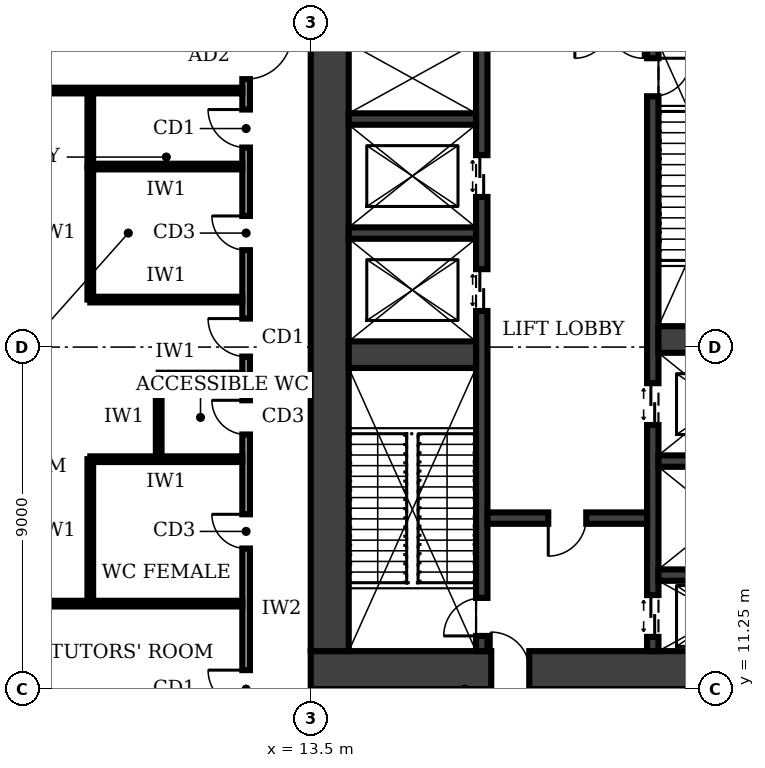
"""IFC4 building model, lengths in metres.
Left out: names, types, materials, properties, quantities, classifications, styles, units other than length and angle.
Written with IfcOpenShell. Run it as: python <this file> out.ifc"""

import sys

from ifc_helpers import new_model, si_unit, direction, frame, frame_2d, origin, place, context, subcontext, project, spatial, rectangle, extrude, element, fill, save


model = new_model("IFC4")
c1 = context("Model", 3, precision=1e-05, world=origin(), true_north=direction((0.0, 1.0)))
c2 = subcontext(c1, "Body", "Model", "MODEL_VIEW")
j1 = project(units=[si_unit("LENGTHUNIT", "METRE"), si_unit("PLANEANGLEUNIT", "RADIAN")], contexts=[c1])
p1 = place(None, origin())
s1 = spatial("IfcSite", under=j1, at=p1, CompositionType="ELEMENT")
p2 = place(p1, origin())
s2 = spatial("IfcBuilding", under=s1, at=p2, CompositionType="ELEMENT")
p3 = place(p2, frame((0.0, 0.0, 6.0)))
s3 = spatial("IfcBuildingStorey", under=s2, at=p3, CompositionType="ELEMENT", Elevation=6.0)
p4 = place(p3, frame((13.5, 11.75, 0.0), z_axis=(0.0, 0.0, 1.0), x_axis=(1.0, 0.0, 0.0)))
e1 = element("IfcWall", 1, at=p4, inside=s3, PredefinedType="SHEAR", context=c2, shape_type="SweptSolid", body=[
    extrude(rectangle(XDim=13.5, YDim=1.0, at=frame_2d((6.75, 0.0))), origin(), (0.0, 0.0, 1.0), 5.0),
])
p5 = place(p4, frame((4.75, 0.0, 0.0)))
e2 = element("IfcOpeningElement", 2, at=p5, cuts=e1, PredefinedType="OPENING", context=c2, shape_type="SweptSolid", body=[
    extrude(rectangle(XDim=1.0, YDim=2.1, at=frame_2d((0.5, 1.05))), frame((0.0, 0.51, 0.0), z_axis=(0.0, -1.0, 0.0), x_axis=(1.0, 0.0, 0.0)), (0.0, 0.0, 1.0), 1.02),
])
p6 = place(p3, frame((14.0, 28.25, 0.0), z_axis=(0.0, 0.0, 1.0), x_axis=(0.0, -1.0, 0.0)))
e3 = element("IfcWall", 3, at=p6, inside=s3, PredefinedType="SHEAR", context=c2, shape_type="SweptSolid", body=[
    extrude(rectangle(XDim=16.0, YDim=1.0, at=frame_2d((8.0, 0.0))), origin(), (0.0, 0.0, 1.0), 5.0),
])
p7 = place(p3, frame((18.0, 12.25, 0.0), z_axis=(0.0, 0.0, 1.0), x_axis=(0.0, 1.0, 0.0)))
e4 = element("IfcWall", 4, at=p7, inside=s3, PredefinedType="SHEAR", context=c2, shape_type="SweptSolid", body=[
    extrude(rectangle(XDim=16.0, YDim=0.3, at=frame_2d((8.0, 0.0))), origin(), (0.0, 0.0, 1.0), 5.0),
])
p8 = place(p7, frame((0.4, 0.0, 0.0)))
e5 = element("IfcOpeningElement", 5, at=p8, cuts=e4, PredefinedType="OPENING", context=c2, shape_type="SweptSolid", body=[
    extrude(rectangle(XDim=1.0, YDim=2.1, at=frame_2d((0.5, 1.05))), frame((0.0, 0.16, 0.0), z_axis=(0.0, -1.0, 0.0), x_axis=(1.0, 0.0, 0.0)), (0.0, 0.0, 1.0), 0.32),
])
p9 = place(p7, frame((8.95, 0.0, 0.0)))
e6 = element("IfcOpeningElement", 6, at=p9, cuts=e4, PredefinedType="OPENING", context=c2, shape_type="SweptSolid", body=[
    extrude(rectangle(XDim=1.1, YDim=2.1, at=frame_2d((0.55, 1.05))), frame((0.0, 0.16, 0.0), z_axis=(0.0, -1.0, 0.0), x_axis=(1.0, 0.0, 0.0)), (0.0, 0.0, 1.0), 0.32),
])
p10 = place(p7, frame((11.95, 0.0, 0.0)))
e7 = element("IfcOpeningElement", 7, at=p10, cuts=e4, PredefinedType="OPENING", context=c2, shape_type="SweptSolid", body=[
    extrude(rectangle(XDim=1.1, YDim=2.1, at=frame_2d((0.55, 1.05))), frame((0.0, 0.16, 0.0), z_axis=(0.0, -1.0, 0.0), x_axis=(1.0, 0.0, 0.0)), (0.0, 0.0, 1.0), 0.32),
])
p11 = place(p3, frame((22.5, 12.25, 0.0), z_axis=(0.0, 0.0, 1.0), x_axis=(0.0, 1.0, 0.0)))
e8 = element("IfcWall", 8, at=p11, inside=s3, PredefinedType="SHEAR", context=c2, shape_type="SweptSolid", body=[
    extrude(rectangle(XDim=16.0, YDim=0.3, at=frame_2d((8.0, 0.0))), origin(), (0.0, 0.0, 1.0), 5.0),
])
p12 = place(p11, frame((14.6, 0.0, 0.0)))
e9 = element("IfcOpeningElement", 9, at=p12, cuts=e8, PredefinedType="OPENING", context=c2, shape_type="SweptSolid", body=[
    extrude(rectangle(XDim=1.0, YDim=2.1, at=frame_2d((0.5, 1.05))), frame((0.0, 0.16, 0.0), z_axis=(0.0, -1.0, 0.0), x_axis=(1.0, 0.0, 0.0)), (0.0, 0.0, 1.0), 0.32),
])
p13 = place(p11, frame((0.375, 0.0, 0.0)))
e10 = element("IfcOpeningElement", 10, at=p13, cuts=e8, PredefinedType="OPENING", context=c2, shape_type="SweptSolid", body=[
    extrude(rectangle(XDim=1.1, YDim=2.1, at=frame_2d((0.55, 1.05))), frame((0.0, 0.16, 0.0), z_axis=(0.0, -1.0, 0.0), x_axis=(1.0, 0.0, 0.0)), (0.0, 0.0, 1.0), 0.32),
])
p14 = place(p11, frame((5.95, 0.0, 0.0)))
e11 = element("IfcOpeningElement", 11, at=p14, cuts=e8, PredefinedType="OPENING", context=c2, shape_type="SweptSolid", body=[
    extrude(rectangle(XDim=1.1, YDim=2.1, at=frame_2d((0.55, 1.05))), frame((0.0, 0.16, 0.0), z_axis=(0.0, -1.0, 0.0), x_axis=(1.0, 0.0, 0.0)), (0.0, 0.0, 1.0), 0.32),
])
p15 = place(p3, frame((14.5, 20.05, 0.0), z_axis=(0.0, 0.0, 1.0), x_axis=(1.0, 0.0, 0.0)))
e12 = element("IfcWall", 12, at=p15, inside=s3, PredefinedType="SHEAR", context=c2, shape_type="SweptSolid", body=[
    extrude(rectangle(XDim=3.35, YDim=0.7, at=frame_2d((1.675, 0.0))), origin(), (0.0, 0.0, 1.0), 5.0),
])
p16 = place(p3, frame((18.15, 15.75, 0.0), z_axis=(0.0, 0.0, 1.0), x_axis=(1.0, 0.0, 0.0)))
e13 = element("IfcWall", 13, at=p16, inside=s3, PredefinedType="SHEAR", context=c2, shape_type="SweptSolid", body=[
    extrude(rectangle(XDim=4.2, YDim=0.3, at=frame_2d((2.1, 0.0))), origin(), (0.0, 0.0, 1.0), 5.0),
])
p17 = place(p16, frame((1.6, 0.0, 0.0)))
e14 = element("IfcOpeningElement", 14, at=p17, cuts=e13, PredefinedType="OPENING", context=c2, shape_type="SweptSolid", body=[
    extrude(rectangle(XDim=1.0, YDim=2.1, at=frame_2d((0.5, 1.05))), frame((0.0, 0.16, 0.0), z_axis=(0.0, -1.0, 0.0), x_axis=(1.0, 0.0, 0.0)), (0.0, 0.0, 1.0), 0.32),
])
for number, where, z_axis, x_axis in (
    (15, (22.65, 14.25, 0.0), (0.0, 0.0, 1.0), (1.0, 0.0, 0.0)),
    (16, (22.65, 17.25, 0.0), (0.0, 0.0, 1.0), (1.0, 0.0, 0.0)),
):
    element("IfcWall", number, at=place(p3, frame(where, z_axis=z_axis, x_axis=x_axis)), inside=s3, PredefinedType="SHEAR", context=c2, shape_type="SweptSolid", body=[
        extrude(rectangle(XDim=3.35, YDim=0.3, at=frame_2d((1.675, 0.0))), origin(), (0.0, 0.0, 1.0), 5.0),
    ])
p18 = place(p3, frame((22.65, 20.45, 0.0), z_axis=(0.0, 0.0, 1.0), x_axis=(1.0, 0.0, 0.0)))
e17 = element("IfcWall", 17, at=p18, inside=s3, PredefinedType="SHEAR", context=c2, shape_type="SweptSolid", body=[
    extrude(rectangle(XDim=3.35, YDim=0.7, at=frame_2d((1.675, 0.0))), origin(), (0.0, 0.0, 1.0), 5.0),
])
for number, where, z_axis, x_axis in (
    (18, (14.5, 23.25, 0.0), (0.0, 0.0, 1.0), (1.0, 0.0, 0.0)),
    (19, (14.5, 26.25, 0.0), (0.0, 0.0, 1.0), (1.0, 0.0, 0.0)),
):
    element("IfcWall", number, at=place(p3, frame(where, z_axis=z_axis, x_axis=x_axis)), inside=s3, PredefinedType="SHEAR", context=c2, shape_type="SweptSolid", body=[
        extrude(rectangle(XDim=3.35, YDim=0.3, at=frame_2d((1.675, 0.0))), origin(), (0.0, 0.0, 1.0), 5.0),
    ])
p19 = place(p3, frame((11.8, 31.3, 0.0), z_axis=(0.0, 0.0, 1.0), x_axis=(0.0, -1.0, 0.0)))
e20 = element("IfcWall", 20, at=p19, inside=s3, PredefinedType="SOLIDWALL", context=c2, shape_type="SweptSolid", body=[
    extrude(rectangle(XDim=22.3, YDim=0.2, at=frame_2d((11.15, 0.0))), origin(), (0.0, 0.0, 1.0), 4.7),
])
p20 = place(p19, frame((19.55, 0.0, 0.0)))
e21 = element("IfcOpeningElement", 21, at=p20, cuts=e20, PredefinedType="OPENING", context=c2, shape_type="SweptSolid", body=[
    extrude(rectangle(XDim=1.0, YDim=2.1, at=frame_2d((0.5, 1.05))), frame((0.0, 0.11, 0.0), z_axis=(0.0, -1.0, 0.0), x_axis=(1.0, 0.0, 0.0)), (0.0, 0.0, 1.0), 0.22),
])
p21 = place(p19, frame((15.45, 0.0, 0.0)))
e22 = element("IfcOpeningElement", 22, at=p21, cuts=e20, PredefinedType="OPENING", context=c2, shape_type="SweptSolid", body=[
    extrude(rectangle(XDim=0.9, YDim=2.1, at=frame_2d((0.45, 1.05))), frame((0.0, 0.11, 0.0), z_axis=(0.0, -1.0, 0.0), x_axis=(1.0, 0.0, 0.0)), (0.0, 0.0, 1.0), 0.22),
])
p22 = place(p19, frame((12.45, 0.0, 0.0)))
e23 = element("IfcOpeningElement", 23, at=p22, cuts=e20, PredefinedType="OPENING", context=c2, shape_type="SweptSolid", body=[
    extrude(rectangle(XDim=0.9, YDim=2.1, at=frame_2d((0.45, 1.05))), frame((0.0, 0.11, 0.0), z_axis=(0.0, -1.0, 0.0), x_axis=(1.0, 0.0, 0.0)), (0.0, 0.0, 1.0), 0.22),
])
p23 = place(p19, frame((7.6, 0.0, 0.0)))
e24 = element("IfcOpeningElement", 24, at=p23, cuts=e20, PredefinedType="OPENING", context=c2, shape_type="SweptSolid", body=[
    extrude(rectangle(XDim=0.9, YDim=2.1, at=frame_2d((0.45, 1.05))), frame((0.0, 0.11, 0.0), z_axis=(0.0, -1.0, 0.0), x_axis=(1.0, 0.0, 0.0)), (0.0, 0.0, 1.0), 0.22),
])
p24 = place(p19, frame((4.8, 0.0, 0.0)))
e25 = element("IfcOpeningElement", 25, at=p24, cuts=e20, PredefinedType="OPENING", context=c2, shape_type="SweptSolid", body=[
    extrude(rectangle(XDim=1.0, YDim=2.1, at=frame_2d((0.5, 1.05))), frame((0.0, 0.11, 0.0), z_axis=(0.0, -1.0, 0.0), x_axis=(1.0, 0.0, 0.0)), (0.0, 0.0, 1.0), 0.22),
])
p25 = place(p19, frame((10.3, 0.0, 0.0)))
e26 = element("IfcOpeningElement", 26, at=p25, cuts=e20, PredefinedType="OPENING", context=c2, shape_type="SweptSolid", body=[
    extrude(rectangle(XDim=1.0, YDim=2.1, at=frame_2d((0.5, 1.05))), frame((0.0, 0.11, 0.0), z_axis=(0.0, -1.0, 0.0), x_axis=(1.0, 0.0, 0.0)), (0.0, 0.0, 1.0), 0.22),
])
p26 = place(p19, frame((2.8, 0.0, 0.0)))
e27 = element("IfcOpeningElement", 27, at=p26, cuts=e20, PredefinedType="OPENING", context=c2, shape_type="SweptSolid", body=[
    extrude(rectangle(XDim=1.2, YDim=2.4, at=frame_2d((0.6, 1.2))), frame((0.0, 0.11, 0.0), z_axis=(0.0, -1.0, 0.0), x_axis=(1.0, 0.0, 0.0)), (0.0, 0.0, 1.0), 0.22),
])
p27 = place(p19, frame((1.45, 0.0, 0.0)))
e28 = element("IfcOpeningElement", 28, at=p27, cuts=e20, PredefinedType="OPENING", context=c2, shape_type="SweptSolid", body=[
    extrude(rectangle(XDim=1.2, YDim=2.4, at=frame_2d((0.6, 1.2))), frame((0.0, 0.11, 0.0), z_axis=(0.0, -1.0, 0.0), x_axis=(1.0, 0.0, 0.0)), (0.0, 0.0, 1.0), 0.22),
])
for number, where, z_axis, x_axis in (
    (29, (0.3, 13.5, 0.0), (0.0, 0.0, 1.0), (1.0, 0.0, 0.0)),
    (30, (0.3, 27.0, 0.0), (0.0, 0.0, 1.0), (1.0, 0.0, 0.0)),
):
    element("IfcWall", number, at=place(p3, frame(where, z_axis=z_axis, x_axis=x_axis)), inside=s3, PredefinedType="PARTITIONING", context=c2, shape_type="SweptSolid", body=[
        extrude(rectangle(XDim=11.4, YDim=0.15, at=frame_2d((5.7, 0.0))), origin(), (0.0, 0.0, 1.0), 4.7),
    ])
p28 = place(p3, frame((11.7, 17.3, 0.0), z_axis=(0.0, 0.0, 1.0), x_axis=(-1.0, 0.0, 0.0)))
e31 = element("IfcWall", 31, at=p28, inside=s3, PredefinedType="PARTITIONING", context=c2, shape_type="SweptSolid", body=[
    extrude(rectangle(XDim=4.0, YDim=0.15, at=frame_2d((2.0, 0.0))), origin(), (0.0, 0.0, 1.0), 4.7),
])
p29 = place(p3, frame((11.7, 19.5, 0.0), z_axis=(0.0, 0.0, 1.0), x_axis=(-1.0, 0.0, 0.0)))
e32 = element("IfcWall", 32, at=p29, inside=s3, PredefinedType="PARTITIONING", context=c2, shape_type="SweptSolid", body=[
    extrude(rectangle(XDim=2.2, YDim=0.15, at=frame_2d((1.1, 0.0))), origin(), (0.0, 0.0, 1.0), 4.7),
])
for number, where, z_axis, x_axis in (
    (33, (11.7, 21.5, 0.0), (0.0, 0.0, 1.0), (-1.0, 0.0, 0.0)),
    (34, (11.7, 25.0, 0.0), (0.0, 0.0, 1.0), (-1.0, 0.0, 0.0)),
):
    element("IfcWall", number, at=place(p3, frame(where, z_axis=z_axis, x_axis=x_axis)), inside=s3, PredefinedType="PARTITIONING", context=c2, shape_type="SweptSolid", body=[
        extrude(rectangle(XDim=4.0, YDim=0.15, at=frame_2d((2.0, 0.0))), origin(), (0.0, 0.0, 1.0), 4.7),
    ])
p30 = place(p3, frame((7.7, 13.5, 0.0), z_axis=(0.0, 0.0, 1.0), x_axis=(0.0, 1.0, 0.0)))
e35 = element("IfcWall", 35, at=p30, inside=s3, PredefinedType="PARTITIONING", context=c2, shape_type="SweptSolid", body=[
    extrude(rectangle(XDim=3.8, YDim=0.15, at=frame_2d((1.9, 0.0))), origin(), (0.0, 0.0, 1.0), 4.7),
])
p31 = place(p3, frame((9.5, 17.3, 0.0), z_axis=(0.0, 0.0, 1.0), x_axis=(0.0, 1.0, 0.0)))
e36 = element("IfcWall", 36, at=p31, inside=s3, PredefinedType="PARTITIONING", context=c2, shape_type="SweptSolid", body=[
    extrude(rectangle(XDim=2.2, YDim=0.15, at=frame_2d((1.1, 0.0))), origin(), (0.0, 0.0, 1.0), 4.7),
])
p32 = place(p3, frame((7.7, 21.5, 0.0), z_axis=(0.0, 0.0, 1.0), x_axis=(0.0, 1.0, 0.0)))
e37 = element("IfcWall", 37, at=p32, inside=s3, PredefinedType="PARTITIONING", context=c2, shape_type="SweptSolid", body=[
    extrude(rectangle(XDim=3.5, YDim=0.15, at=frame_2d((1.75, 0.0))), origin(), (0.0, 0.0, 1.0), 4.7),
])
p33 = place(p3, frame((7.7, 25.0, 0.0), z_axis=(0.0, 0.0, 1.0), x_axis=(0.0, 1.0, 0.0)))
e38 = element("IfcWall", 38, at=p33, inside=s3, PredefinedType="PARTITIONING", context=c2, shape_type="SweptSolid", body=[
    extrude(rectangle(XDim=2.0, YDim=0.15, at=frame_2d((1.0, 0.0))), origin(), (0.0, 0.0, 1.0), 4.7),
])
p34 = place(p5, origin())
e39 = element("IfcDoor", 39, at=p34, inside=s3, OperationType="SINGLE_SWING_LEFT", PredefinedType="DOOR", context=c2, shape_type="SweptSolid", body=[
    extrude(rectangle(XDim=1.0, YDim=2.1, at=frame_2d((0.5, 1.05))), frame((0.0, 0.025, 0.0), z_axis=(0.0, -1.0, 0.0), x_axis=(1.0, 0.0, 0.0)), (0.0, 0.0, 1.0), 0.05),
])
fill(e2, e39)
p35 = place(p17, frame((1.0, 0.0, 0.0), z_axis=(0.0, 0.0, 1.0), x_axis=(-1.0, 0.0, 0.0)))
e40 = element("IfcDoor", 40, at=p35, inside=s3, OperationType="SINGLE_SWING_RIGHT", PredefinedType="DOOR", context=c2, shape_type="SweptSolid", body=[
    extrude(rectangle(XDim=1.0, YDim=2.1, at=frame_2d((0.5, 1.05))), frame((0.0, 0.025, 0.0), z_axis=(0.0, -1.0, 0.0), x_axis=(1.0, 0.0, 0.0)), (0.0, 0.0, 1.0), 0.05),
])
fill(e14, e40)
p36 = place(p8, origin())
e41 = element("IfcDoor", 41, at=p36, inside=s3, OperationType="SINGLE_SWING_LEFT", PredefinedType="DOOR", context=c2, shape_type="SweptSolid", body=[
    extrude(rectangle(XDim=1.0, YDim=2.1, at=frame_2d((0.5, 1.05))), frame((0.0, 0.025, 0.0), z_axis=(0.0, -1.0, 0.0), x_axis=(1.0, 0.0, 0.0)), (0.0, 0.0, 1.0), 0.05),
])
fill(e5, e41)
p37 = place(p12, frame((1.0, 0.0, 0.0), z_axis=(0.0, 0.0, 1.0), x_axis=(-1.0, 0.0, 0.0)))
e42 = element("IfcDoor", 42, at=p37, inside=s3, OperationType="SINGLE_SWING_LEFT", PredefinedType="DOOR", context=c2, shape_type="SweptSolid", body=[
    extrude(rectangle(XDim=1.0, YDim=2.1, at=frame_2d((0.5, 1.05))), frame((0.0, 0.025, 0.0), z_axis=(0.0, -1.0, 0.0), x_axis=(1.0, 0.0, 0.0)), (0.0, 0.0, 1.0), 0.05),
])
fill(e9, e42)
p38 = place(p13, origin())
e43 = element("IfcDoor", 43, at=p38, inside=s3, OperationType="DOUBLE_DOOR_SLIDING", PredefinedType="DOOR", context=c2, shape_type="SweptSolid", body=[
    extrude(rectangle(XDim=1.1, YDim=2.1, at=frame_2d((0.55, 1.05))), frame((0.0, 0.025, 0.0), z_axis=(0.0, -1.0, 0.0), x_axis=(1.0, 0.0, 0.0)), (0.0, 0.0, 1.0), 0.05),
])
fill(e10, e43)
p39 = place(p9, origin())
e44 = element("IfcDoor", 44, at=p39, inside=s3, OperationType="DOUBLE_DOOR_SLIDING", PredefinedType="DOOR", context=c2, shape_type="SweptSolid", body=[
    extrude(rectangle(XDim=1.1, YDim=2.1, at=frame_2d((0.55, 1.05))), frame((0.0, 0.025, 0.0), z_axis=(0.0, -1.0, 0.0), x_axis=(1.0, 0.0, 0.0)), (0.0, 0.0, 1.0), 0.05),
])
fill(e6, e44)
p40 = place(p10, origin())
e45 = element("IfcDoor", 45, at=p40, inside=s3, OperationType="DOUBLE_DOOR_SLIDING", PredefinedType="DOOR", context=c2, shape_type="SweptSolid", body=[
    extrude(rectangle(XDim=1.1, YDim=2.1, at=frame_2d((0.55, 1.05))), frame((0.0, 0.025, 0.0), z_axis=(0.0, -1.0, 0.0), x_axis=(1.0, 0.0, 0.0)), (0.0, 0.0, 1.0), 0.05),
])
fill(e7, e45)
p41 = place(p14, origin())
e46 = element("IfcDoor", 46, at=p41, inside=s3, OperationType="DOUBLE_DOOR_SLIDING", PredefinedType="DOOR", context=c2, shape_type="SweptSolid", body=[
    extrude(rectangle(XDim=1.1, YDim=2.1, at=frame_2d((0.55, 1.05))), frame((0.0, 0.025, 0.0), z_axis=(0.0, -1.0, 0.0), x_axis=(1.0, 0.0, 0.0)), (0.0, 0.0, 1.0), 0.05),
])
fill(e11, e46)
p42 = place(p20, frame((1.0, 0.0, 0.0), z_axis=(0.0, 0.0, 1.0), x_axis=(-1.0, 0.0, 0.0)))
e47 = element("IfcDoor", 47, at=p42, inside=s3, OperationType="SINGLE_SWING_RIGHT", PredefinedType="DOOR", context=c2, shape_type="SweptSolid", body=[
    extrude(rectangle(XDim=1.0, YDim=2.1, at=frame_2d((0.5, 1.05))), frame((0.0, 0.025, 0.0), z_axis=(0.0, -1.0, 0.0), x_axis=(1.0, 0.0, 0.0)), (0.0, 0.0, 1.0), 0.05),
])
fill(e21, e47)
p43 = place(p21, frame((0.9, 0.0, 0.0), z_axis=(0.0, 0.0, 1.0), x_axis=(-1.0, 0.0, 0.0)))
e48 = element("IfcDoor", 48, at=p43, inside=s3, OperationType="SINGLE_SWING_RIGHT", PredefinedType="DOOR", context=c2, shape_type="SweptSolid", body=[
    extrude(rectangle(XDim=0.9, YDim=2.1, at=frame_2d((0.45, 1.05))), frame((0.0, 0.025, 0.0), z_axis=(0.0, -1.0, 0.0), x_axis=(1.0, 0.0, 0.0)), (0.0, 0.0, 1.0), 0.05),
])
fill(e22, e48)
p44 = place(p22, frame((0.9, 0.0, 0.0), z_axis=(0.0, 0.0, 1.0), x_axis=(-1.0, 0.0, 0.0)))
e49 = element("IfcDoor", 49, at=p44, inside=s3, OperationType="SINGLE_SWING_RIGHT", PredefinedType="DOOR", context=c2, shape_type="SweptSolid", body=[
    extrude(rectangle(XDim=0.9, YDim=2.1, at=frame_2d((0.45, 1.05))), frame((0.0, 0.025, 0.0), z_axis=(0.0, -1.0, 0.0), x_axis=(1.0, 0.0, 0.0)), (0.0, 0.0, 1.0), 0.05),
])
fill(e23, e49)
p45 = place(p23, frame((0.9, 0.0, 0.0), z_axis=(0.0, 0.0, 1.0), x_axis=(-1.0, 0.0, 0.0)))
e50 = element("IfcDoor", 50, at=p45, inside=s3, OperationType="SINGLE_SWING_RIGHT", PredefinedType="DOOR", context=c2, shape_type="SweptSolid", body=[
    extrude(rectangle(XDim=0.9, YDim=2.1, at=frame_2d((0.45, 1.05))), frame((0.0, 0.025, 0.0), z_axis=(0.0, -1.0, 0.0), x_axis=(1.0, 0.0, 0.0)), (0.0, 0.0, 1.0), 0.05),
])
fill(e24, e50)
p46 = place(p24, frame((1.0, 0.0, 0.0), z_axis=(0.0, 0.0, 1.0), x_axis=(-1.0, 0.0, 0.0)))
e51 = element("IfcDoor", 51, at=p46, inside=s3, OperationType="SINGLE_SWING_RIGHT", PredefinedType="DOOR", context=c2, shape_type="SweptSolid", body=[
    extrude(rectangle(XDim=1.0, YDim=2.1, at=frame_2d((0.5, 1.05))), frame((0.0, 0.025, 0.0), z_axis=(0.0, -1.0, 0.0), x_axis=(1.0, 0.0, 0.0)), (0.0, 0.0, 1.0), 0.05),
])
fill(e25, e51)
p47 = place(p25, frame((1.0, 0.0, 0.0), z_axis=(0.0, 0.0, 1.0), x_axis=(-1.0, 0.0, 0.0)))
e52 = element("IfcDoor", 52, at=p47, inside=s3, OperationType="SINGLE_SWING_RIGHT", PredefinedType="DOOR", context=c2, shape_type="SweptSolid", body=[
    extrude(rectangle(XDim=1.0, YDim=2.1, at=frame_2d((0.5, 1.05))), frame((0.0, 0.025, 0.0), z_axis=(0.0, -1.0, 0.0), x_axis=(1.0, 0.0, 0.0)), (0.0, 0.0, 1.0), 0.05),
])
fill(e26, e52)
p48 = place(p26, origin())
e53 = element("IfcDoor", 53, at=p48, inside=s3, OperationType="SINGLE_SWING_LEFT", PredefinedType="DOOR", context=c2, shape_type="SweptSolid", body=[
    extrude(rectangle(XDim=1.2, YDim=2.4, at=frame_2d((0.6, 1.2))), frame((0.0, 0.025, 0.0), z_axis=(0.0, -1.0, 0.0), x_axis=(1.0, 0.0, 0.0)), (0.0, 0.0, 1.0), 0.05),
])
fill(e27, e53)
save(model, sys.argv[1])
